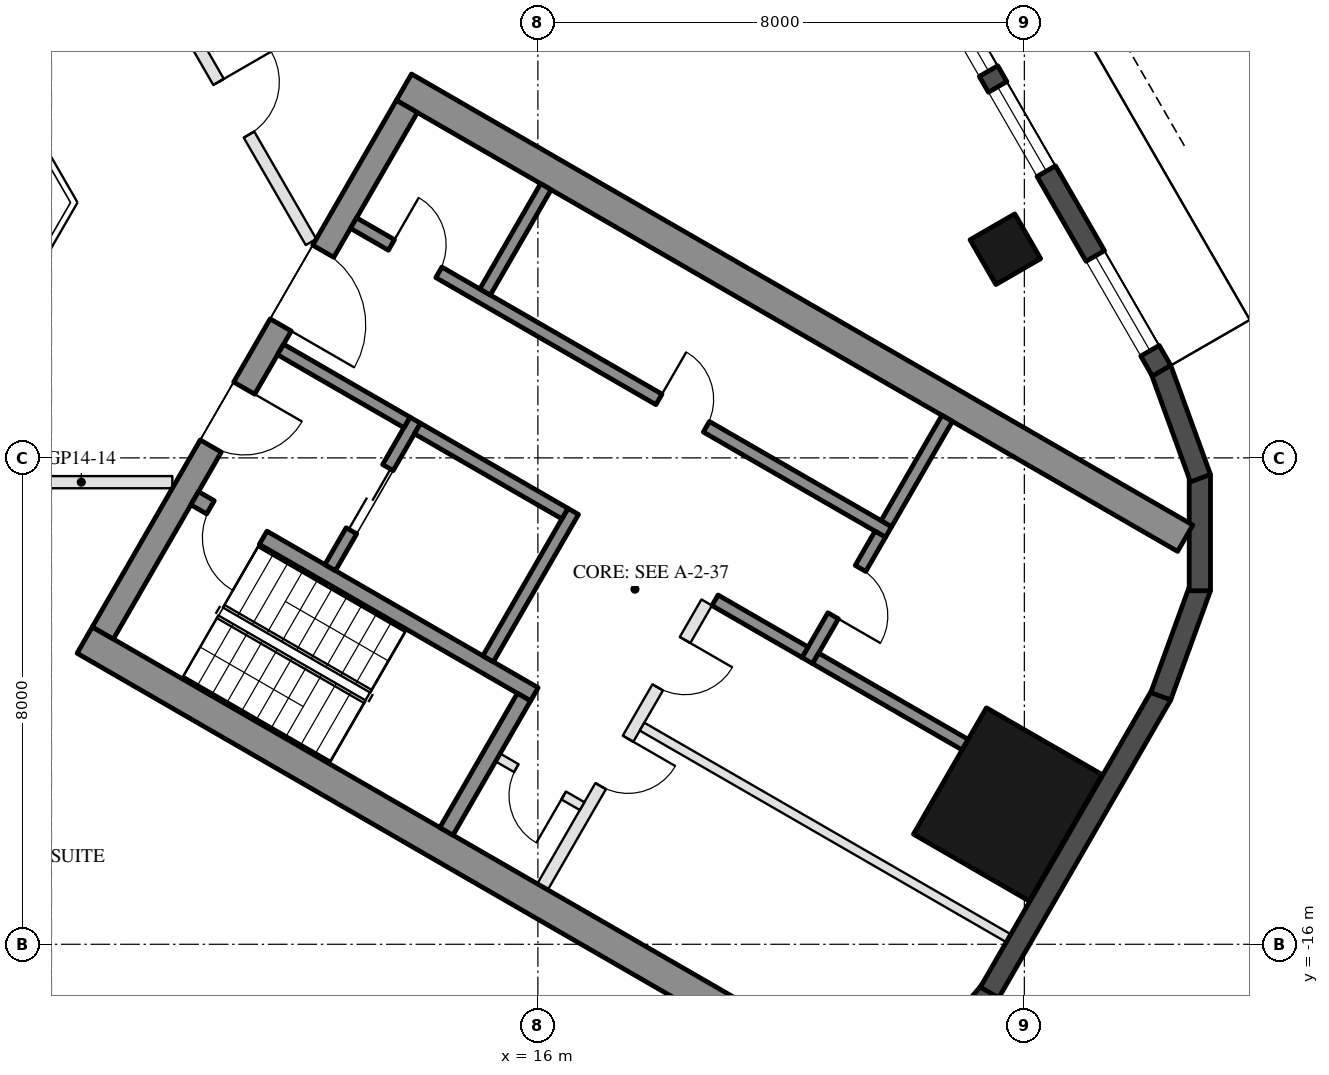
"""IFC4 building model, lengths in metres.
Left out: names, types, materials, properties, quantities, classifications, styles, units other than length and angle.
Written with IfcOpenShell. Run it as: python <this file> out.ifc"""

import sys

from ifc_helpers import new_model, si_unit, direction, frame, frame_2d, origin, origin_2d, place, context, subcontext, project, spatial, rectangle, hollow_rectangle, extrude, element, fill, save


model = new_model("IFC4")
c1 = context("Model", 3, precision=1e-05, world=origin(), true_north=direction((0.0, 1.0)))
c2 = subcontext(c1, "Body", "Model", "MODEL_VIEW")
j1 = project(units=[si_unit("LENGTHUNIT", "METRE"), si_unit("PLANEANGLEUNIT", "RADIAN")], contexts=[c1])
p1 = place(None, origin())
s1 = spatial("IfcSite", under=j1, at=p1, CompositionType="ELEMENT")
p2 = place(p1, origin())
s2 = spatial("IfcBuilding", under=s1, at=p2, CompositionType="ELEMENT")
p3 = place(p2, frame((0.0, 0.0, 161.4)))
s3 = spatial("IfcBuildingStorey", under=s2, at=p3, CompositionType="ELEMENT", Elevation=161.4)
p4 = place(p3, frame((23.688, -4.568, 0.0), z_axis=(0.0, 0.0, 1.0), x_axis=(-0.5, 0.866025403784, 0.0)))
e1 = element("IfcColumn", 1, at=p4, inside=s3, PredefinedType="COLUMN", context=c2, shape_type="SweptSolid", body=[
    extrude(hollow_rectangle(XDim=0.85, YDim=0.85, WallThickness=0.04, at=origin_2d()), origin(), (0.0, 0.0, 1.0), 3.7),
])
p5 = place(p3, frame((23.729, -13.7, 0.0), z_axis=(0.0, 0.0, 1.0), x_axis=(0.5, 0.866025403784, 0.0)))
e2 = element("IfcColumn", 2, at=p5, inside=s3, PredefinedType="COLUMN", context=c2, shape_type="SweptSolid", body=[
    extrude(hollow_rectangle(XDim=2.4, YDim=2.2, WallThickness=0.06, at=origin_2d()), origin(), (0.0, 0.0, 1.0), 3.7),
])
p6 = place(p3, frame((22.217, -18.231, 0.0), z_axis=(0.0, 0.0, 1.0), x_axis=(0.642733291068, 0.76609001857, 0.0)))
e3 = element("IfcWall", 3, at=p6, inside=s3, PredefinedType="SOLIDWALL", context=c2, shape_type="SweptSolid", body=[
    extrude(rectangle(XDim=1.91, YDim=0.35, at=frame_2d((0.955, 0.0))), origin(), (0.0, 0.0, 1.0), 3.55),
])
p7 = place(p3, frame((23.427, -16.792, 0.0), z_axis=(0.0, 0.0, 1.0), x_axis=(0.500018773155, 0.866014564827, 0.0)))
e4 = element("IfcWall", 4, at=p7, inside=s3, PredefinedType="SOLIDWALL", context=c2, shape_type="SweptSolid", body=[
    extrude(rectangle(XDim=5.658, YDim=0.35, at=frame_2d((2.829, 0.0))), origin(), (0.0, 0.0, 1.0), 3.55),
])
for number, where, z_axis, x_axis in (
    (5, (26.244, -11.92, 0.0), (0.0, 0.0, 1.0), (0.342, 0.94, 0.0)),
    (6, (26.886, -10.185, 0.0), (0.0, 0.0, 1.0), (0.0, 1.0, 0.0)),
    (7, (26.897, -8.335, 0.0), (0.0, 0.0, 1.0), (-0.342, 0.94, 0.0)),
):
    element("IfcWall", number, at=place(p3, frame(where, z_axis=z_axis, x_axis=x_axis)), inside=s3, PredefinedType="SOLIDWALL", context=c2, shape_type="SweptSolid", body=[
        extrude(rectangle(XDim=1.91, YDim=0.35, at=frame_2d((0.955, 0.0))), origin(), (0.0, 0.0, 1.0), 3.55),
    ])
p8 = place(p3, frame((26.257, -6.567, 0.0), z_axis=(0.0, 0.0, 1.0), x_axis=(-0.500023526245, 0.866011820475, 0.0)))
e8 = element("IfcWall", 8, at=p8, inside=s3, PredefinedType="SOLIDWALL", context=c2, shape_type="SweptSolid", body=[
    extrude(rectangle(XDim=11.816, YDim=0.35, at=frame_2d((5.908, 0.0))), origin(), (0.0, 0.0, 1.0), 3.55),
])
p9 = place(p8, frame((0.38, 0.0, 0.3)))
e9 = element("IfcOpeningElement", 9, at=p9, cuts=e8, PredefinedType="OPENING", context=c2, shape_type="SweptSolid", body=[
    extrude(rectangle(XDim=1.8, YDim=2.65, at=frame_2d((0.9, 1.325))), frame((0.0, 0.185, 0.0), z_axis=(0.0, -1.0, 0.0), x_axis=(1.0, 0.0, 0.0)), (0.0, 0.0, 1.0), 0.37),
])
p10 = place(p8, frame((7.741, 0.0, 0.0)))
e10 = element("IfcOpeningElement", 10, at=p10, cuts=e8, PredefinedType="OPENING", context=c2, shape_type="SweptSolid", body=[
    extrude(rectangle(XDim=2.4, YDim=2.4, at=frame_2d((1.2, 1.2))), frame((0.0, 0.185, 0.0), z_axis=(0.0, -1.0, 0.0), x_axis=(1.0, 0.0, 0.0)), (0.0, 0.0, 1.0), 0.37),
])
p11 = place(p8, frame((3.791, 0.0, 0.3)))
e11 = element("IfcOpeningElement", 11, at=p11, cuts=e8, PredefinedType="OPENING", context=c2, shape_type="SweptSolid", body=[
    extrude(rectangle(XDim=1.6, YDim=2.65, at=frame_2d((0.8, 1.325))), frame((0.0, 0.185, 0.0), z_axis=(0.0, -1.0, 0.0), x_axis=(1.0, 0.0, 0.0)), (0.0, 0.0, 1.0), 0.37),
])
p12 = place(p8, frame((5.691, 0.0, 0.3)))
e12 = element("IfcOpeningElement", 12, at=p12, cuts=e8, PredefinedType="OPENING", context=c2, shape_type="SweptSolid", body=[
    extrude(rectangle(XDim=1.6, YDim=2.65, at=frame_2d((0.8, 1.325))), frame((0.0, 0.185, 0.0), z_axis=(0.0, -1.0, 0.0), x_axis=(1.0, 0.0, 0.0)), (0.0, 0.0, 1.0), 0.37),
])
for number, where, z_axis, x_axis in (
    (13, (8.547, -10.997, 0.0), (0.0, 0.0, 1.0), (0.866, -0.5, 0.0)),
    (14, (13.797, -1.903, 0.0), (0.0, 0.0, 1.0), (0.866, -0.5, 0.0)),
):
    element("IfcWall", number, at=place(p3, frame(where, z_axis=z_axis, x_axis=x_axis)), inside=s3, PredefinedType="SHEAR", context=c2, shape_type="SweptSolid", body=[
        extrude(rectangle(XDim=14.837, YDim=0.5, at=frame_2d((7.418, 0.0))), origin(), (0.0, 0.0, 1.0), 3.5),
    ])
p13 = place(p3, frame((8.845, -10.88, 0.0), z_axis=(0.0, 0.0, 1.0), x_axis=(0.500004234368, 0.866022959057, 0.0)))
e15 = element("IfcWall", 15, at=p13, inside=s3, PredefinedType="SHEAR", context=c2, shape_type="SweptSolid", body=[
    extrude(rectangle(XDim=10.0, YDim=0.4, at=frame_2d((5.0, 0.0))), origin(), (0.0, 0.0, 1.0), 3.5),
])
p14 = place(p13, frame((3.55, 0.0, 0.0)))
e16 = element("IfcOpeningElement", 16, at=p14, cuts=e15, PredefinedType="OPENING", context=c2, shape_type="SweptSolid", body=[
    extrude(rectangle(XDim=1.1, YDim=2.1, at=frame_2d((0.55, 1.05))), frame((0.0, 0.21, 0.0), z_axis=(0.0, -1.0, 0.0), x_axis=(1.0, 0.0, 0.0)), (0.0, 0.0, 1.0), 0.42),
])
p15 = place(p13, frame((5.85, 0.0, 0.0)))
e17 = element("IfcOpeningElement", 17, at=p15, cuts=e15, PredefinedType="OPENING", context=c2, shape_type="SweptSolid", body=[
    extrude(rectangle(XDim=1.4, YDim=2.1, at=frame_2d((0.7, 1.05))), frame((0.0, 0.21, 0.0), z_axis=(0.0, -1.0, 0.0), x_axis=(1.0, 0.0, 0.0)), (0.0, 0.0, 1.0), 0.42),
])
p16 = place(p3, frame((10.356, -8.664, 0.0), z_axis=(0.0, 0.0, 1.0), x_axis=(0.866028629588, -0.499994412703, 0.0)))
e18 = element("IfcWall", 18, at=p16, inside=s3, PredefinedType="SHEAR", context=c2, shape_type="SweptSolid", body=[
    extrude(rectangle(XDim=6.45, YDim=0.25, at=frame_2d((3.225, 0.0))), origin(), (0.0, 0.0, 1.0), 3.5),
])
p17 = place(p16, frame((0.3, 0.0, 0.0)))
e19 = element("IfcOpeningElement", 19, at=p17, cuts=e18, PredefinedType="OPENING", context=c2, shape_type="SweptSolid", body=[
    extrude(rectangle(XDim=1.0, YDim=2.1, at=frame_2d((0.5, 1.05))), frame((0.0, 0.135, 0.0), z_axis=(0.0, -1.0, 0.0), x_axis=(1.0, 0.0, 0.0)), (0.0, 0.0, 1.0), 0.27),
])
p18 = place(p3, frame((14.496, -14.143, 0.0), z_axis=(0.0, 0.0, 1.0), x_axis=(0.500062241894, 0.865989465428, 0.0)))
e20 = element("IfcWall", 20, at=p18, inside=s3, PredefinedType="SHEAR", context=c2, shape_type="SweptSolid", body=[
    extrude(rectangle(XDim=2.55, YDim=0.25, at=frame_2d((1.275, 0.0))), origin(), (0.0, 0.0, 1.0), 3.5),
])
p19 = place(p3, frame((15.181, -11.305, 0.0), z_axis=(0.0, 0.0, 1.0), x_axis=(0.49994636267, 0.866056369097, 0.0)))
e21 = element("IfcWall", 21, at=p19, inside=s3, PredefinedType="SHEAR", context=c2, shape_type="SweptSolid", body=[
    extrude(rectangle(XDim=2.8, YDim=0.2, at=frame_2d((1.4, 0.0))), origin(), (0.0, 0.0, 1.0), 3.5),
])
p20 = place(p3, frame((12.583, -9.805, 0.0), z_axis=(0.0, 0.0, 1.0), x_axis=(0.49994636267, 0.866056369097, 0.0)))
e22 = element("IfcWall", 22, at=p20, inside=s3, PredefinedType="SHEAR", context=c2, shape_type="SweptSolid", body=[
    extrude(rectangle(XDim=2.8, YDim=0.2, at=frame_2d((1.4, 0.0))), origin(), (0.0, 0.0, 1.0), 3.5),
])
p21 = place(p20, frame((0.7, 0.0, 0.0)))
e23 = element("IfcOpeningElement", 23, at=p21, cuts=e22, PredefinedType="OPENING", context=c2, shape_type="SweptSolid", body=[
    extrude(rectangle(XDim=1.2, YDim=2.1, at=frame_2d((0.6, 1.05))), frame((0.0, 0.11, 0.0), z_axis=(0.0, -1.0, 0.0), x_axis=(1.0, 0.0, 0.0)), (0.0, 0.0, 1.0), 0.22),
])
p22 = place(p3, frame((11.768, -6.217, 0.0), z_axis=(0.0, 0.0, 1.0), x_axis=(0.866050077142, -0.499957262057, 0.0)))
e24 = element("IfcWall", 24, at=p22, inside=s3, PredefinedType="SHEAR", context=c2, shape_type="SweptSolid", body=[
    extrude(rectangle(XDim=2.4, YDim=0.2, at=frame_2d((1.2, 0.0))), origin(), (0.0, 0.0, 1.0), 3.5),
])
p23 = place(p3, frame((14.02, -7.517, 0.0), z_axis=(0.0, 0.0, 1.0), x_axis=(0.866034573852, -0.49998411664, 0.0)))
e25 = element("IfcWall", 25, at=p23, inside=s3, PredefinedType="SHEAR", context=c2, shape_type="SweptSolid", body=[
    extrude(rectangle(XDim=2.8, YDim=0.2, at=frame_2d((1.4, 0.0))), origin(), (0.0, 0.0, 1.0), 3.5),
])
p24 = place(p3, frame((12.968, -4.138, 0.0), z_axis=(0.0, 0.0, 1.0), x_axis=(0.866028328073, -0.49999493495, 0.0)))
e26 = element("IfcWall", 26, at=p24, inside=s3, PredefinedType="SHEAR", context=c2, shape_type="SweptSolid", body=[
    extrude(rectangle(XDim=10.16, YDim=0.2, at=frame_2d((5.08, 0.0))), origin(), (0.0, 0.0, 1.0), 3.5),
])
p25 = place(p24, frame((0.72, 0.0, 0.0)))
e27 = element("IfcOpeningElement", 27, at=p25, cuts=e26, PredefinedType="OPENING", context=c2, shape_type="SweptSolid", body=[
    extrude(rectangle(XDim=0.9, YDim=2.1, at=frame_2d((0.45, 1.05))), frame((0.0, 0.11, 0.0), z_axis=(0.0, -1.0, 0.0), x_axis=(1.0, 0.0, 0.0)), (0.0, 0.0, 1.0), 0.22),
])
p26 = place(p24, frame((5.8, 0.0, 0.0)))
e28 = element("IfcOpeningElement", 28, at=p26, cuts=e26, PredefinedType="OPENING", context=c2, shape_type="SweptSolid", body=[
    extrude(rectangle(XDim=0.9, YDim=2.1, at=frame_2d((0.45, 1.05))), frame((0.0, 0.11, 0.0), z_axis=(0.0, -1.0, 0.0), x_axis=(1.0, 0.0, 0.0)), (0.0, 0.0, 1.0), 0.22),
])
p27 = place(p3, frame((20.43, -11.333, 0.0), z_axis=(0.0, 0.0, 1.0), x_axis=(0.500001309137, 0.866024647952, 0.0)))
e29 = element("IfcWall", 29, at=p27, inside=s3, PredefinedType="SHEAR", context=c2, shape_type="SweptSolid", body=[
    extrude(rectangle(XDim=2.4, YDim=0.2, at=frame_2d((1.2, 0.0))), origin(), (0.0, 0.0, 1.0), 3.5),
])
p28 = place(p27, frame((0.85, 0.0, 0.0)))
e30 = element("IfcOpeningElement", 30, at=p28, cuts=e29, PredefinedType="OPENING", context=c2, shape_type="SweptSolid", body=[
    extrude(rectangle(XDim=0.9, YDim=2.1, at=frame_2d((0.45, 1.05))), frame((0.0, 0.11, 0.0), z_axis=(0.0, -1.0, 0.0), x_axis=(1.0, 0.0, 0.0)), (0.0, 0.0, 1.0), 0.22),
])
p29 = place(p3, frame((18.913, -10.342, 0.0), z_axis=(0.0, 0.0, 1.0), x_axis=(0.866038183914, -0.499977863513, 0.0)))
e31 = element("IfcWall", 31, at=p29, inside=s3, PredefinedType="SHEAR", context=c2, shape_type="SweptSolid", body=[
    extrude(rectangle(XDim=1.71, YDim=0.2, at=frame_2d((0.855, 0.0))), origin(), (0.0, 0.0, 1.0), 3.5),
])
for number, where, z_axis, x_axis in (
    (32, (15.131, -5.272, 0.0), (0.0, 0.0, 1.0), (0.5, 0.866, 0.0)),
    (33, (21.73, -9.082, 0.0), (0.0, 0.0, 1.0), (0.5, 0.866, 0.0)),
):
    element("IfcWall", number, at=place(p3, frame(where, z_axis=z_axis, x_axis=x_axis)), inside=s3, PredefinedType="SHEAR", context=c2, shape_type="SweptSolid", body=[
        extrude(rectangle(XDim=2.0, YDim=0.2, at=frame_2d((1.0, 0.0))), origin(), (0.0, 0.0, 1.0), 3.5),
    ])
p30 = place(p3, frame((20.567, -11.297, 0.0), z_axis=(0.0, 0.0, 1.0), x_axis=(0.866055327414, -0.49994816717, 0.0)))
e34 = element("IfcWall", 34, at=p30, inside=s3, PredefinedType="SHEAR", context=c2, shape_type="SweptSolid", body=[
    extrude(rectangle(XDim=2.84, YDim=0.2, at=frame_2d((1.42, 0.0))), origin(), (0.0, 0.0, 1.0), 3.5),
])
p31 = place(p3, frame((16.076, -15.055, 0.0), z_axis=(0.0, 0.0, 1.0), x_axis=(0.499995103361, 0.866028230842, 0.0)))
e35 = element("IfcWall", 35, at=p31, inside=s3, PredefinedType="PARTITIONING", context=c2, shape_type="SweptSolid", body=[
    extrude(rectangle(XDim=5.4, YDim=0.2, at=frame_2d((2.7, 0.0))), origin(), (0.0, 0.0, 1.0), 3.5),
])
p32 = place(p31, frame((1.913, 0.0, 0.0)))
e36 = element("IfcOpeningElement", 36, at=p32, cuts=e35, PredefinedType="OPENING", context=c2, shape_type="SweptSolid", body=[
    extrude(rectangle(XDim=0.9, YDim=2.1, at=frame_2d((0.45, 1.05))), frame((0.0, 0.11, 0.0), z_axis=(0.0, -1.0, 0.0), x_axis=(1.0, 0.0, 0.0)), (0.0, 0.0, 1.0), 0.22),
])
p33 = place(p31, frame((3.788, 0.0, 0.0)))
e37 = element("IfcOpeningElement", 37, at=p33, cuts=e35, PredefinedType="OPENING", context=c2, shape_type="SweptSolid", body=[
    extrude(rectangle(XDim=0.9, YDim=2.1, at=frame_2d((0.45, 1.05))), frame((0.0, 0.11, 0.0), z_axis=(0.0, -1.0, 0.0), x_axis=(1.0, 0.0, 0.0)), (0.0, 0.0, 1.0), 0.22),
])
p34 = place(p3, frame((15.342, -12.928, 0.0), z_axis=(0.0, 0.0, 1.0), x_axis=(0.865989903783, -0.500061482766, 0.0)))
e38 = element("IfcWall", 38, at=p34, inside=s3, PredefinedType="PARTITIONING", context=c2, shape_type="SweptSolid", body=[
    extrude(rectangle(XDim=1.6, YDim=0.15, at=frame_2d((0.8, 0.0))), origin(), (0.0, 0.0, 1.0), 3.5),
])
p35 = place(p34, frame((0.35, 0.0, 0.0)))
e39 = element("IfcOpeningElement", 39, at=p35, cuts=e38, PredefinedType="OPENING", context=c2, shape_type="SweptSolid", body=[
    extrude(rectangle(XDim=0.9, YDim=2.1, at=frame_2d((0.45, 1.05))), frame((0.0, 0.085, 0.0), z_axis=(0.0, -1.0, 0.0), x_axis=(1.0, 0.0, 0.0)), (0.0, 0.0, 1.0), 0.17),
])
p36 = place(p3, frame((17.713, -12.42, 0.0), z_axis=(0.0, 0.0, 1.0), x_axis=(0.866016523273, -0.500015381182, 0.0)))
e40 = element("IfcWall", 40, at=p36, inside=s3, PredefinedType="PARTITIONING", context=c2, shape_type="SweptSolid", body=[
    extrude(rectangle(XDim=6.95, YDim=0.15, at=frame_2d((3.475, 0.0))), origin(), (0.0, 0.0, 1.0), 3.5),
])
p37 = place(p3, frame((9.988, -8.4, 0.0), z_axis=(0.0, 0.0, 1.0), x_axis=(-1.0, 0.0, 0.0)))
e41 = element("IfcWall", 41, at=p37, inside=s3, PredefinedType="PARTITIONING", context=c2, shape_type="SweptSolid", body=[
    extrude(rectangle(XDim=7.488, YDim=0.2, at=frame_2d((3.744, 0.0))), origin(), (0.0, 0.0, 1.0), 2.95),
])
p38 = place(p37, frame((3.244, 0.0, 0.0)))
e42 = element("IfcOpeningElement", 42, at=p38, cuts=e41, PredefinedType="OPENING", context=c2, shape_type="SweptSolid", body=[
    extrude(rectangle(XDim=1.0, YDim=2.1, at=frame_2d((0.5, 1.05))), frame((0.0, 0.11, 0.0), z_axis=(0.0, -1.0, 0.0), x_axis=(1.0, 0.0, 0.0)), (0.0, 0.0, 1.0), 0.22),
])
p39 = place(p3, frame((9.729, -0.051, 0.0), z_axis=(0.0, 0.0, 1.0), x_axis=(0.500005339912, -0.866022320763, 0.0)))
e43 = element("IfcWall", 43, at=p39, inside=s3, PredefinedType="PARTITIONING", context=c2, shape_type="SweptSolid", body=[
    extrude(rectangle(XDim=5.08, YDim=0.2, at=frame_2d((2.54, 0.0))), origin(), (0.0, 0.0, 1.0), 2.95),
])
p40 = place(p39, frame((2.04, 0.0, 0.0)))
e44 = element("IfcOpeningElement", 44, at=p40, cuts=e43, PredefinedType="OPENING", context=c2, shape_type="SweptSolid", body=[
    extrude(rectangle(XDim=1.0, YDim=2.1, at=frame_2d((0.5, 1.05))), frame((0.0, 0.11, 0.0), z_axis=(0.0, -1.0, 0.0), x_axis=(1.0, 0.0, 0.0)), (0.0, 0.0, 1.0), 0.22),
])
p41 = place(p9, origin())
e45 = element("IfcWindow", 45, at=p41, inside=s3, PartitioningType="SINGLE_PANEL", PredefinedType="WINDOW", context=c2, shape_type="SweptSolid", body=[
    extrude(rectangle(XDim=1.8, YDim=2.65, at=frame_2d((0.9, 1.325))), frame((0.0, 0.03, 0.0), z_axis=(0.0, -1.0, 0.0), x_axis=(1.0, 0.0, 0.0)), (0.0, 0.0, 1.0), 0.06),
])
fill(e9, e45)
p42 = place(p11, origin())
e46 = element("IfcWindow", 46, at=p42, inside=s3, PartitioningType="SINGLE_PANEL", PredefinedType="WINDOW", context=c2, shape_type="SweptSolid", body=[
    extrude(rectangle(XDim=1.6, YDim=2.65, at=frame_2d((0.8, 1.325))), frame((0.0, 0.03, 0.0), z_axis=(0.0, -1.0, 0.0), x_axis=(1.0, 0.0, 0.0)), (0.0, 0.0, 1.0), 0.06),
])
fill(e11, e46)
p43 = place(p12, origin())
e47 = element("IfcWindow", 47, at=p43, inside=s3, PartitioningType="SINGLE_PANEL", PredefinedType="WINDOW", context=c2, shape_type="SweptSolid", body=[
    extrude(rectangle(XDim=1.6, YDim=2.65, at=frame_2d((0.8, 1.325))), frame((0.0, 0.03, 0.0), z_axis=(0.0, -1.0, 0.0), x_axis=(1.0, 0.0, 0.0)), (0.0, 0.0, 1.0), 0.06),
])
fill(e12, e47)
p44 = place(p21, origin())
e48 = element("IfcDoor", 48, at=p44, inside=s3, OperationType="DOUBLE_DOOR_SLIDING", PredefinedType="DOOR", context=c2, shape_type="SweptSolid", body=[
    extrude(rectangle(XDim=1.2, YDim=2.1, at=frame_2d((0.6, 1.05))), frame((0.0, 0.025, 0.0), z_axis=(0.0, -1.0, 0.0), x_axis=(1.0, 0.0, 0.0)), (0.0, 0.0, 1.0), 0.05),
])
fill(e23, e48)
p45 = place(p35, frame((0.9, 0.0, 0.0), z_axis=(0.0, 0.0, 1.0), x_axis=(-1.0, 0.0, 0.0)))
e49 = element("IfcDoor", 49, at=p45, inside=s3, OperationType="SINGLE_SWING_LEFT", PredefinedType="DOOR", context=c2, shape_type="SweptSolid", body=[
    extrude(rectangle(XDim=0.9, YDim=2.1, at=frame_2d((0.45, 1.05))), frame((0.0, 0.025, 0.0), z_axis=(0.0, -1.0, 0.0), x_axis=(1.0, 0.0, 0.0)), (0.0, 0.0, 1.0), 0.05),
])
fill(e39, e49)
p46 = place(p25, origin())
e50 = element("IfcDoor", 50, at=p46, inside=s3, OperationType="SINGLE_SWING_LEFT", PredefinedType="DOOR", context=c2, shape_type="SweptSolid", body=[
    extrude(rectangle(XDim=0.9, YDim=2.1, at=frame_2d((0.45, 1.05))), frame((0.0, 0.025, 0.0), z_axis=(0.0, -1.0, 0.0), x_axis=(1.0, 0.0, 0.0)), (0.0, 0.0, 1.0), 0.05),
])
fill(e27, e50)
p47 = place(p26, origin())
e51 = element("IfcDoor", 51, at=p47, inside=s3, OperationType="SINGLE_SWING_LEFT", PredefinedType="DOOR", context=c2, shape_type="SweptSolid", body=[
    extrude(rectangle(XDim=0.9, YDim=2.1, at=frame_2d((0.45, 1.05))), frame((0.0, 0.025, 0.0), z_axis=(0.0, -1.0, 0.0), x_axis=(1.0, 0.0, 0.0)), (0.0, 0.0, 1.0), 0.05),
])
fill(e28, e51)
p48 = place(p28, frame((0.9, 0.0, 0.0), z_axis=(0.0, 0.0, 1.0), x_axis=(-1.0, 0.0, 0.0)))
e52 = element("IfcDoor", 52, at=p48, inside=s3, OperationType="SINGLE_SWING_RIGHT", PredefinedType="DOOR", context=c2, shape_type="SweptSolid", body=[
    extrude(rectangle(XDim=0.9, YDim=2.1, at=frame_2d((0.45, 1.05))), frame((0.0, 0.025, 0.0), z_axis=(0.0, -1.0, 0.0), x_axis=(1.0, 0.0, 0.0)), (0.0, 0.0, 1.0), 0.05),
])
fill(e30, e52)
p49 = place(p32, frame((0.9, 0.0, 0.0), z_axis=(0.0, 0.0, 1.0), x_axis=(-1.0, 0.0, 0.0)))
e53 = element("IfcDoor", 53, at=p49, inside=s3, OperationType="SINGLE_SWING_LEFT", PredefinedType="DOOR", context=c2, shape_type="SweptSolid", body=[
    extrude(rectangle(XDim=0.9, YDim=2.1, at=frame_2d((0.45, 1.05))), frame((0.0, 0.025, 0.0), z_axis=(0.0, -1.0, 0.0), x_axis=(1.0, 0.0, 0.0)), (0.0, 0.0, 1.0), 0.05),
])
fill(e36, e53)
p50 = place(p33, frame((0.9, 0.0, 0.0), z_axis=(0.0, 0.0, 1.0), x_axis=(-1.0, 0.0, 0.0)))
e54 = element("IfcDoor", 54, at=p50, inside=s3, OperationType="SINGLE_SWING_LEFT", PredefinedType="DOOR", context=c2, shape_type="SweptSolid", body=[
    extrude(rectangle(XDim=0.9, YDim=2.1, at=frame_2d((0.45, 1.05))), frame((0.0, 0.025, 0.0), z_axis=(0.0, -1.0, 0.0), x_axis=(1.0, 0.0, 0.0)), (0.0, 0.0, 1.0), 0.05),
])
fill(e37, e54)
p51 = place(p14, frame((1.1, 0.0, 0.0), z_axis=(0.0, 0.0, 1.0), x_axis=(-1.0, 0.0, 0.0)))
e55 = element("IfcDoor", 55, at=p51, inside=s3, OperationType="SINGLE_SWING_LEFT", PredefinedType="DOOR", context=c2, shape_type="SweptSolid", body=[
    extrude(rectangle(XDim=1.1, YDim=2.1, at=frame_2d((0.55, 1.05))), frame((0.0, 0.025, 0.0), z_axis=(0.0, -1.0, 0.0), x_axis=(1.0, 0.0, 0.0)), (0.0, 0.0, 1.0), 0.05),
])
fill(e16, e55)
p52 = place(p15, frame((1.4, 0.0, 0.0), z_axis=(0.0, 0.0, 1.0), x_axis=(-1.0, 0.0, 0.0)))
e56 = element("IfcDoor", 56, at=p52, inside=s3, OperationType="DOUBLE_DOOR_SINGLE_SWING", PredefinedType="DOOR", context=c2, shape_type="SweptSolid", body=[
    extrude(rectangle(XDim=1.4, YDim=2.1, at=frame_2d((0.7, 1.05))), frame((0.0, 0.025, 0.0), z_axis=(0.0, -1.0, 0.0), x_axis=(1.0, 0.0, 0.0)), (0.0, 0.0, 1.0), 0.05),
])
fill(e17, e56)
p53 = place(p17, frame((1.0, 0.0, 0.0), z_axis=(0.0, 0.0, 1.0), x_axis=(-1.0, 0.0, 0.0)))
e57 = element("IfcDoor", 57, at=p53, inside=s3, OperationType="SINGLE_SWING_LEFT", PredefinedType="DOOR", context=c2, shape_type="SweptSolid", body=[
    extrude(rectangle(XDim=1.0, YDim=2.1, at=frame_2d((0.5, 1.05))), frame((0.0, 0.025, 0.0), z_axis=(0.0, -1.0, 0.0), x_axis=(1.0, 0.0, 0.0)), (0.0, 0.0, 1.0), 0.05),
])
fill(e19, e57)
p54 = place(p40, origin())
e58 = element("IfcDoor", 58, at=p54, inside=s3, OperationType="SINGLE_SWING_LEFT", PredefinedType="DOOR", context=c2, shape_type="SweptSolid", body=[
    extrude(rectangle(XDim=1.0, YDim=2.1, at=frame_2d((0.5, 1.05))), frame((0.0, 0.025, 0.0), z_axis=(0.0, -1.0, 0.0), x_axis=(1.0, 0.0, 0.0)), (0.0, 0.0, 1.0), 0.05),
])
fill(e44, e58)
save(model, sys.argv[1])
